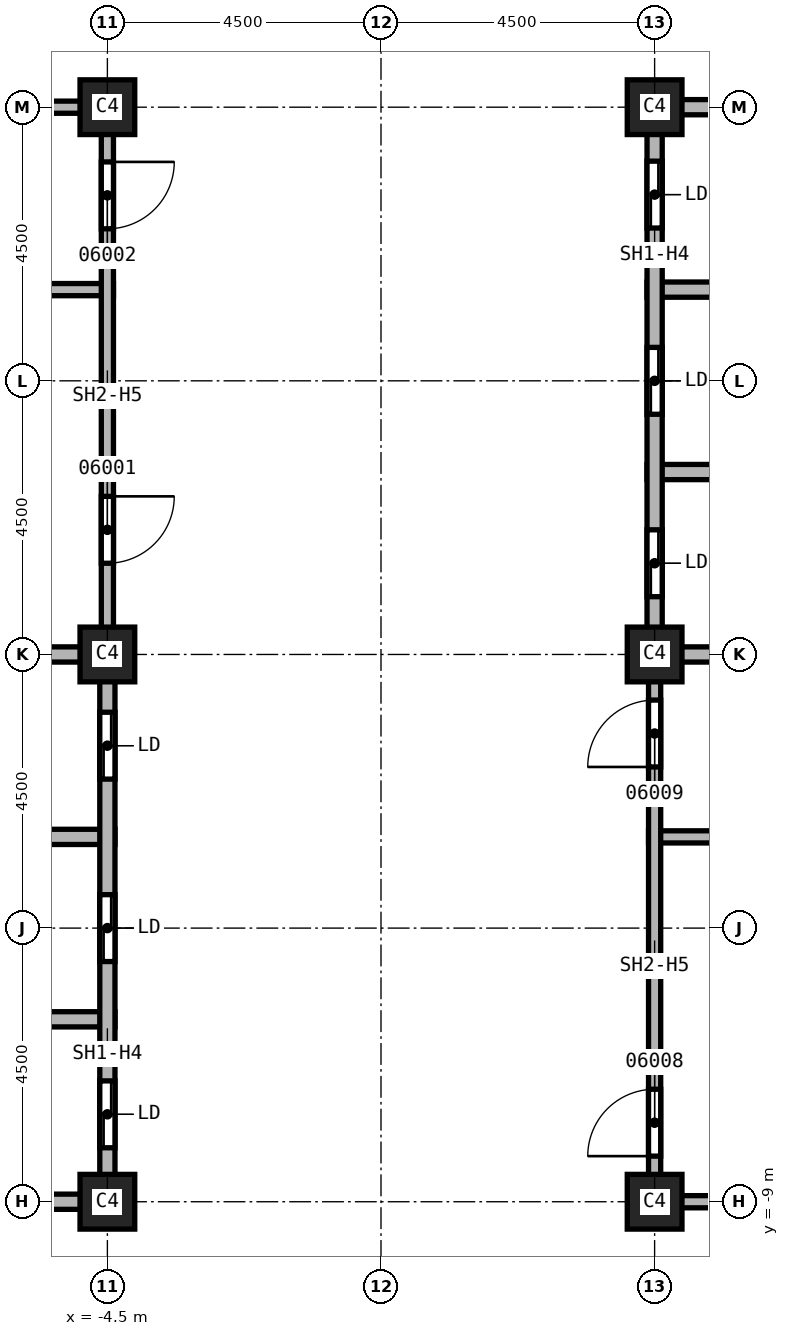
"""IFC4 building model, lengths in metres.
Left out: names, types, materials, properties, quantities, classifications, styles, units other than length and angle.
Written with IfcOpenShell. Run it as: python <this file> out.ifc"""

import sys

from ifc_helpers import new_model, si_unit, direction, frame, frame_2d, origin, origin_2d, place, context, subcontext, project, spatial, rectangle, extrude, element, fill, save


model = new_model("IFC4")
c1 = context("Model", 3, precision=1e-05, world=origin(), true_north=direction((0.0, 1.0)))
c2 = subcontext(c1, "Body", "Model", "MODEL_VIEW")
j1 = project(units=[si_unit("LENGTHUNIT", "METRE"), si_unit("PLANEANGLEUNIT", "RADIAN")], contexts=[c1])
p1 = place(None, origin())
s1 = spatial("IfcSite", under=j1, at=p1, CompositionType="ELEMENT")
p2 = place(p1, origin())
s2 = spatial("IfcBuilding", under=s1, at=p2, CompositionType="ELEMENT")
p3 = place(p2, frame((0.0, 0.0, 126.0)))
s3 = spatial("IfcBuildingStorey", under=s2, at=p3, CompositionType="ELEMENT", Elevation=126.0)
for number, where, z_axis, x_axis in (
    (1, (4.5, 0.0, 0.0), (0.0, 0.0, 1.0), (1.0, 0.0, 0.0)),
    (2, (4.5, 9.0, 0.0), (0.0, 0.0, 1.0), (1.0, 0.0, 0.0)),
    (3, (4.5, -9.0, 0.0), (0.0, 0.0, 1.0), (1.0, 0.0, 0.0)),
    (4, (-4.5, 0.0, 0.0), (0.0, 0.0, 1.0), (1.0, 0.0, 0.0)),
    (5, (-4.5, 9.0, 0.0), (0.0, 0.0, 1.0), (1.0, 0.0, 0.0)),
    (6, (-4.5, -9.0, 0.0), (0.0, 0.0, 1.0), (1.0, 0.0, 0.0)),
):
    element("IfcColumn", number, at=place(p3, frame(where, z_axis=z_axis, x_axis=x_axis)), inside=s3, PredefinedType="COLUMN", context=c2, shape_type="SweptSolid", body=[
        extrude(rectangle(XDim=0.9, YDim=0.9, at=origin_2d()), origin(), (0.0, 0.0, 1.0), 3.7),
    ])
p4 = place(p3, frame((-7.6, 6.0, 0.0), z_axis=(0.0, 0.0, 1.0), x_axis=(1.0, 0.0, 0.0)))
e7 = element("IfcWall", 7, at=p4, inside=s3, PredefinedType="SOLIDWALL", context=c2, shape_type="SweptSolid", body=[
    extrude(rectangle(XDim=3.2, YDim=0.2, at=frame_2d((1.6, 0.0))), origin(), (0.0, 0.0, 1.0), 3.7),
])
p5 = place(p3, frame((-7.5, 9.0, 0.0), z_axis=(0.0, 0.0, 1.0), x_axis=(1.0, 0.0, 0.0)))
e8 = element("IfcWall", 8, at=p5, inside=s3, PredefinedType="SOLIDWALL", context=c2, shape_type="SweptSolid", body=[
    extrude(rectangle(XDim=3.0, YDim=0.2, at=frame_2d((1.5, 0.0))), origin(), (0.0, 0.0, 1.0), 2.938),
])
p6 = place(p3, frame((-4.5, 9.1, 0.0), z_axis=(0.0, 0.0, 1.0), x_axis=(0.0, -1.0, 0.0)))
e9 = element("IfcWall", 9, at=p6, inside=s3, PredefinedType="SOLIDWALL", context=c2, shape_type="SweptSolid", body=[
    extrude(rectangle(XDim=9.1, YDim=0.2, at=frame_2d((4.55, 0.0))), origin(), (0.0, 0.0, 1.0), 2.938),
])
p7 = place(p6, frame((6.5, 0.0, 0.0)))
e10 = element("IfcOpeningElement", 10, at=p7, cuts=e9, PredefinedType="OPENING", context=c2, shape_type="SweptSolid", body=[
    extrude(rectangle(XDim=1.1, YDim=2.1, at=frame_2d((0.55, 1.05))), frame((0.0, 0.1, 0.0), z_axis=(0.0, -1.0, 0.0), x_axis=(1.0, 0.0, 0.0)), (0.0, 0.0, 1.0), 0.2),
])
p8 = place(p6, frame((1.0, 0.0, 0.0)))
e11 = element("IfcOpeningElement", 11, at=p8, cuts=e9, PredefinedType="OPENING", context=c2, shape_type="SweptSolid", body=[
    extrude(rectangle(XDim=1.1, YDim=2.1, at=frame_2d((0.55, 1.05))), frame((0.0, 0.1, 0.0), z_axis=(0.0, -1.0, 0.0), x_axis=(1.0, 0.0, 0.0)), (0.0, 0.0, 1.0), 0.2),
])
p9 = place(p3, frame((4.4, -3.0, 0.0), z_axis=(0.0, 0.0, 1.0), x_axis=(1.0, 0.0, 0.0)))
e12 = element("IfcWall", 12, at=p9, inside=s3, PredefinedType="SOLIDWALL", context=c2, shape_type="SweptSolid", body=[
    extrude(rectangle(XDim=3.225, YDim=0.2, at=frame_2d((1.613, 0.0))), origin(), (0.0, 0.0, 1.0), 3.7),
])
p10 = place(p3, frame((4.5, -9.1, 0.0), z_axis=(0.0, 0.0, 1.0), x_axis=(0.0, 1.0, 0.0)))
e13 = element("IfcWall", 13, at=p10, inside=s3, PredefinedType="SOLIDWALL", context=c2, shape_type="SweptSolid", body=[
    extrude(rectangle(XDim=9.1, YDim=0.2, at=frame_2d((4.55, 0.0))), origin(), (0.0, 0.0, 1.0), 2.938),
])
p11 = place(p10, frame((0.85, 0.0, 0.0)))
e14 = element("IfcOpeningElement", 14, at=p11, cuts=e13, PredefinedType="OPENING", context=c2, shape_type="SweptSolid", body=[
    extrude(rectangle(XDim=1.1, YDim=2.1, at=frame_2d((0.55, 1.05))), frame((0.0, 0.1, 0.0), z_axis=(0.0, -1.0, 0.0), x_axis=(1.0, 0.0, 0.0)), (0.0, 0.0, 1.0), 0.2),
])
p12 = place(p10, frame((7.25, 0.0, 0.0)))
e15 = element("IfcOpeningElement", 15, at=p12, cuts=e13, PredefinedType="OPENING", context=c2, shape_type="SweptSolid", body=[
    extrude(rectangle(XDim=1.1, YDim=2.1, at=frame_2d((0.55, 1.05))), frame((0.0, 0.1, 0.0), z_axis=(0.0, -1.0, 0.0), x_axis=(1.0, 0.0, 0.0)), (0.0, 0.0, 1.0), 0.2),
])
p13 = place(p3, frame((7.5, -9.0, 0.0), z_axis=(0.0, 0.0, 1.0), x_axis=(-1.0, 0.0, 0.0)))
e16 = element("IfcWall", 16, at=p13, inside=s3, PredefinedType="SOLIDWALL", context=c2, shape_type="SweptSolid", body=[
    extrude(rectangle(XDim=3.0, YDim=0.2, at=frame_2d((1.5, 0.0))), origin(), (0.0, 0.0, 1.0), 2.938),
])
p14 = place(p3, frame((-13.625, -3.0, 0.0), z_axis=(0.0, 0.0, 1.0), x_axis=(1.0, 0.0, 0.0)))
e17 = element("IfcWall", 17, at=p14, inside=s3, PredefinedType="SOLIDWALL", context=c2, shape_type="SweptSolid", body=[
    extrude(rectangle(XDim=9.25, YDim=0.25, at=frame_2d((4.625, 0.0))), origin(), (0.0, 0.0, 1.0), 3.7),
])
p15 = place(p14, frame((3.25, 0.0, 0.0)))
e18 = element("IfcOpeningElement", 18, at=p15, cuts=e17, PredefinedType="OPENING", context=c2, shape_type="SweptSolid", body=[
    extrude(rectangle(XDim=1.1, YDim=2.1, at=frame_2d((0.55, 1.05))), frame((0.0, 0.125, 0.0), z_axis=(0.0, -1.0, 0.0), x_axis=(1.0, 0.0, 0.0)), (0.0, 0.0, 1.0), 0.25),
])
for number, where, z_axis, x_axis in (
    (19, (-7.625, -6.0, 0.0), (0.0, 0.0, 1.0), (1.0, 0.0, 0.0)),
    (20, (-7.625, 0.0, 0.0), (0.0, 0.0, 1.0), (1.0, 0.0, 0.0)),
):
    element("IfcWall", number, at=place(p3, frame(where, z_axis=z_axis, x_axis=x_axis)), inside=s3, PredefinedType="SOLIDWALL", context=c2, shape_type="SweptSolid", body=[
        extrude(rectangle(XDim=3.25, YDim=0.25, at=frame_2d((1.625, 0.0))), origin(), (0.0, 0.0, 1.0), 3.7),
    ])
p16 = place(p3, frame((-4.5, -9.0, 0.0), z_axis=(0.0, 0.0, 1.0), x_axis=(-1.0, 0.0, 0.0)))
e21 = element("IfcWall", 21, at=p16, inside=s3, PredefinedType="SOLIDWALL", context=c2, shape_type="SweptSolid", body=[
    extrude(rectangle(XDim=3.0, YDim=0.25, at=frame_2d((1.5, 0.0))), origin(), (0.0, 0.0, 1.0), 2.938),
])
p17 = place(p3, frame((-4.5, 0.0, 0.0), z_axis=(0.0, 0.0, 1.0), x_axis=(0.0, -1.0, 0.0)))
e22 = element("IfcWall", 22, at=p17, inside=s3, PredefinedType="SOLIDWALL", context=c2, shape_type="SweptSolid", body=[
    extrude(rectangle(XDim=9.125, YDim=0.25, at=frame_2d((4.562, 0.0))), origin(), (0.0, 0.0, 1.0), 2.938),
])
p18 = place(p17, frame((7.012, 0.0, 0.0)))
e23 = element("IfcOpeningElement", 23, at=p18, cuts=e22, PredefinedType="OPENING", context=c2, shape_type="SweptSolid", body=[
    extrude(rectangle(XDim=1.1, YDim=2.1, at=frame_2d((0.55, 1.05))), frame((0.0, 0.125, 0.0), z_axis=(0.0, -1.0, 0.0), x_axis=(1.0, 0.0, 0.0)), (0.0, 0.0, 1.0), 0.25),
])
p19 = place(p17, frame((3.95, 0.0, 0.0)))
e24 = element("IfcOpeningElement", 24, at=p19, cuts=e22, PredefinedType="OPENING", context=c2, shape_type="SweptSolid", body=[
    extrude(rectangle(XDim=1.1, YDim=2.1, at=frame_2d((0.55, 1.05))), frame((0.0, 0.125, 0.0), z_axis=(0.0, -1.0, 0.0), x_axis=(1.0, 0.0, 0.0)), (0.0, 0.0, 1.0), 0.25),
])
p20 = place(p17, frame((0.95, 0.0, 0.0)))
e25 = element("IfcOpeningElement", 25, at=p20, cuts=e22, PredefinedType="OPENING", context=c2, shape_type="SweptSolid", body=[
    extrude(rectangle(XDim=1.1, YDim=2.1, at=frame_2d((0.55, 1.05))), frame((0.0, 0.125, 0.0), z_axis=(0.0, -1.0, 0.0), x_axis=(1.0, 0.0, 0.0)), (0.0, 0.0, 1.0), 0.25),
])
p21 = place(p3, frame((4.375, 0.0, 0.0), z_axis=(0.0, 0.0, 1.0), x_axis=(1.0, 0.0, 0.0)))
e26 = element("IfcWall", 26, at=p21, inside=s3, PredefinedType="SOLIDWALL", context=c2, shape_type="SweptSolid", body=[
    extrude(rectangle(XDim=3.25, YDim=0.25, at=frame_2d((1.625, 0.0))), origin(), (0.0, 0.0, 1.0), 3.7),
])
p22 = place(p3, frame((4.375, 3.0, 0.0), z_axis=(0.0, 0.0, 1.0), x_axis=(1.0, 0.0, 0.0)))
e27 = element("IfcWall", 27, at=p22, inside=s3, PredefinedType="SOLIDWALL", context=c2, shape_type="SweptSolid", body=[
    extrude(rectangle(XDim=9.25, YDim=0.25, at=frame_2d((4.625, 0.0))), origin(), (0.0, 0.0, 1.0), 3.7),
])
p23 = place(p22, frame((3.375, 0.0, 0.0)))
e28 = element("IfcOpeningElement", 28, at=p23, cuts=e27, PredefinedType="OPENING", context=c2, shape_type="SweptSolid", body=[
    extrude(rectangle(XDim=1.1, YDim=2.1, at=frame_2d((0.55, 1.05))), frame((0.0, 0.125, 0.0), z_axis=(0.0, -1.0, 0.0), x_axis=(1.0, 0.0, 0.0)), (0.0, 0.0, 1.0), 0.25),
])
p24 = place(p3, frame((4.375, 6.0, 0.0), z_axis=(0.0, 0.0, 1.0), x_axis=(1.0, 0.0, 0.0)))
e29 = element("IfcWall", 29, at=p24, inside=s3, PredefinedType="SOLIDWALL", context=c2, shape_type="SweptSolid", body=[
    extrude(rectangle(XDim=3.25, YDim=0.25, at=frame_2d((1.625, 0.0))), origin(), (0.0, 0.0, 1.0), 3.7),
])
p25 = place(p3, frame((4.5, 0.0, 0.0), z_axis=(0.0, 0.0, 1.0), x_axis=(0.0, 1.0, 0.0)))
e30 = element("IfcWall", 30, at=p25, inside=s3, PredefinedType="SOLIDWALL", context=c2, shape_type="SweptSolid", body=[
    extrude(rectangle(XDim=9.125, YDim=0.25, at=frame_2d((4.562, 0.0))), origin(), (0.0, 0.0, 1.0), 2.938),
])
p26 = place(p25, frame((0.95, 0.0, 0.0)))
e31 = element("IfcOpeningElement", 31, at=p26, cuts=e30, PredefinedType="OPENING", context=c2, shape_type="SweptSolid", body=[
    extrude(rectangle(XDim=1.1, YDim=2.1, at=frame_2d((0.55, 1.05))), frame((0.0, 0.125, 0.0), z_axis=(0.0, -1.0, 0.0), x_axis=(1.0, 0.0, 0.0)), (0.0, 0.0, 1.0), 0.25),
])
p27 = place(p25, frame((3.95, 0.0, 0.0)))
e32 = element("IfcOpeningElement", 32, at=p27, cuts=e30, PredefinedType="OPENING", context=c2, shape_type="SweptSolid", body=[
    extrude(rectangle(XDim=1.1, YDim=2.1, at=frame_2d((0.55, 1.05))), frame((0.0, 0.125, 0.0), z_axis=(0.0, -1.0, 0.0), x_axis=(1.0, 0.0, 0.0)), (0.0, 0.0, 1.0), 0.25),
])
p28 = place(p25, frame((7.012, 0.0, 0.0)))
e33 = element("IfcOpeningElement", 33, at=p28, cuts=e30, PredefinedType="OPENING", context=c2, shape_type="SweptSolid", body=[
    extrude(rectangle(XDim=1.1, YDim=2.1, at=frame_2d((0.55, 1.05))), frame((0.0, 0.125, 0.0), z_axis=(0.0, -1.0, 0.0), x_axis=(1.0, 0.0, 0.0)), (0.0, 0.0, 1.0), 0.25),
])
p29 = place(p3, frame((4.5, 9.0, 0.0), z_axis=(0.0, 0.0, 1.0), x_axis=(1.0, 0.0, 0.0)))
e34 = element("IfcWall", 34, at=p29, inside=s3, PredefinedType="SOLIDWALL", context=c2, shape_type="SweptSolid", body=[
    extrude(rectangle(XDim=3.0, YDim=0.25, at=frame_2d((1.5, 0.0))), origin(), (0.0, 0.0, 1.0), 2.938),
])
p30 = place(p7, origin())
e35 = element("IfcDoor", 35, at=p30, inside=s3, OperationType="SINGLE_SWING_RIGHT", PredefinedType="DOOR", context=c2, shape_type="SweptSolid", body=[
    extrude(rectangle(XDim=1.1, YDim=2.1, at=frame_2d((0.55, 1.05))), frame((0.0, 0.025, 0.0), z_axis=(0.0, -1.0, 0.0), x_axis=(1.0, 0.0, 0.0)), (0.0, 0.0, 1.0), 0.05),
])
fill(e10, e35)
p31 = place(p8, origin())
e36 = element("IfcDoor", 36, at=p31, inside=s3, OperationType="SINGLE_SWING_LEFT", PredefinedType="DOOR", context=c2, shape_type="SweptSolid", body=[
    extrude(rectangle(XDim=1.1, YDim=2.1, at=frame_2d((0.55, 1.05))), frame((0.0, 0.025, 0.0), z_axis=(0.0, -1.0, 0.0), x_axis=(1.0, 0.0, 0.0)), (0.0, 0.0, 1.0), 0.05),
])
fill(e11, e36)
p32 = place(p11, origin())
e37 = element("IfcDoor", 37, at=p32, inside=s3, OperationType="SINGLE_SWING_LEFT", PredefinedType="DOOR", context=c2, shape_type="SweptSolid", body=[
    extrude(rectangle(XDim=1.1, YDim=2.1, at=frame_2d((0.55, 1.05))), frame((0.0, 0.025, 0.0), z_axis=(0.0, -1.0, 0.0), x_axis=(1.0, 0.0, 0.0)), (0.0, 0.0, 1.0), 0.05),
])
fill(e14, e37)
p33 = place(p12, origin())
e38 = element("IfcDoor", 38, at=p33, inside=s3, OperationType="SINGLE_SWING_RIGHT", PredefinedType="DOOR", context=c2, shape_type="SweptSolid", body=[
    extrude(rectangle(XDim=1.1, YDim=2.1, at=frame_2d((0.55, 1.05))), frame((0.0, 0.025, 0.0), z_axis=(0.0, -1.0, 0.0), x_axis=(1.0, 0.0, 0.0)), (0.0, 0.0, 1.0), 0.05),
])
fill(e15, e38)
p34 = place(p18, origin())
e39 = element("IfcDoor", 39, at=p34, inside=s3, OperationType="SLIDING_TO_LEFT", PredefinedType="DOOR", context=c2, shape_type="SweptSolid", body=[
    extrude(rectangle(XDim=1.1, YDim=2.1, at=frame_2d((0.55, 1.05))), frame((0.0, 0.025, 0.0), z_axis=(0.0, -1.0, 0.0), x_axis=(1.0, 0.0, 0.0)), (0.0, 0.0, 1.0), 0.05),
])
fill(e23, e39)
p35 = place(p19, origin())
e40 = element("IfcDoor", 40, at=p35, inside=s3, OperationType="SLIDING_TO_LEFT", PredefinedType="DOOR", context=c2, shape_type="SweptSolid", body=[
    extrude(rectangle(XDim=1.1, YDim=2.1, at=frame_2d((0.55, 1.05))), frame((0.0, 0.025, 0.0), z_axis=(0.0, -1.0, 0.0), x_axis=(1.0, 0.0, 0.0)), (0.0, 0.0, 1.0), 0.05),
])
fill(e24, e40)
p36 = place(p20, origin())
e41 = element("IfcDoor", 41, at=p36, inside=s3, OperationType="SLIDING_TO_LEFT", PredefinedType="DOOR", context=c2, shape_type="SweptSolid", body=[
    extrude(rectangle(XDim=1.1, YDim=2.1, at=frame_2d((0.55, 1.05))), frame((0.0, 0.025, 0.0), z_axis=(0.0, -1.0, 0.0), x_axis=(1.0, 0.0, 0.0)), (0.0, 0.0, 1.0), 0.05),
])
fill(e25, e41)
p37 = place(p26, origin())
e42 = element("IfcDoor", 42, at=p37, inside=s3, OperationType="SLIDING_TO_LEFT", PredefinedType="DOOR", context=c2, shape_type="SweptSolid", body=[
    extrude(rectangle(XDim=1.1, YDim=2.1, at=frame_2d((0.55, 1.05))), frame((0.0, 0.025, 0.0), z_axis=(0.0, -1.0, 0.0), x_axis=(1.0, 0.0, 0.0)), (0.0, 0.0, 1.0), 0.05),
])
fill(e31, e42)
p38 = place(p27, origin())
e43 = element("IfcDoor", 43, at=p38, inside=s3, OperationType="SLIDING_TO_LEFT", PredefinedType="DOOR", context=c2, shape_type="SweptSolid", body=[
    extrude(rectangle(XDim=1.1, YDim=2.1, at=frame_2d((0.55, 1.05))), frame((0.0, 0.025, 0.0), z_axis=(0.0, -1.0, 0.0), x_axis=(1.0, 0.0, 0.0)), (0.0, 0.0, 1.0), 0.05),
])
fill(e32, e43)
p39 = place(p28, origin())
e44 = element("IfcDoor", 44, at=p39, inside=s3, OperationType="SLIDING_TO_LEFT", PredefinedType="DOOR", context=c2, shape_type="SweptSolid", body=[
    extrude(rectangle(XDim=1.1, YDim=2.1, at=frame_2d((0.55, 1.05))), frame((0.0, 0.025, 0.0), z_axis=(0.0, -1.0, 0.0), x_axis=(1.0, 0.0, 0.0)), (0.0, 0.0, 1.0), 0.05),
])
fill(e33, e44)
save(model, sys.argv[1])
